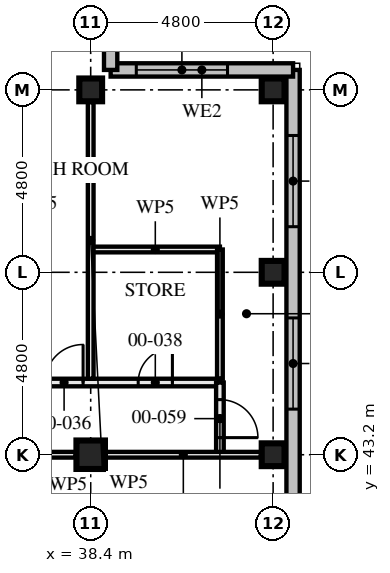
"""IFC4 building model, lengths in metres.
Left out: names, types, materials, properties, quantities, classifications, styles, units other than length and angle.
Written with IfcOpenShell. Run it as: python <this file> out.ifc"""

import sys

from ifc_helpers import new_model, si_unit, direction, frame, frame_2d, origin, origin_2d, place, context, subcontext, project, spatial, rectangle, hollow_rectangle, extrude, element, fill, save


model = new_model("IFC4")
c1 = context("Model", 3, precision=1e-05, world=origin(), true_north=direction((0.0, 1.0)))
c2 = subcontext(c1, "Body", "Model", "MODEL_VIEW")
j1 = project(units=[si_unit("LENGTHUNIT", "METRE"), si_unit("PLANEANGLEUNIT", "RADIAN")], contexts=[c1])
p1 = place(None, origin())
s1 = spatial("IfcSite", under=j1, at=p1, CompositionType="ELEMENT")
p2 = place(p1, origin())
s2 = spatial("IfcBuilding", under=s1, at=p2, CompositionType="ELEMENT")
p3 = place(p2, origin())
s3 = spatial("IfcBuildingStorey", under=s2, at=p3, CompositionType="ELEMENT", Elevation=0.0)
p4 = place(p3, frame((38.4, 43.2, 0.0), z_axis=(0.0, 0.0, 1.0), x_axis=(0.0, 1.0, 0.0)))
e1 = element("IfcColumn", 1, at=p4, inside=s3, PredefinedType="COLUMN", context=c2, shape_type="SweptSolid", body=[
    extrude(hollow_rectangle(XDim=0.75, YDim=0.75, WallThickness=0.08, at=origin_2d()), origin(), (0.0, 0.0, 1.0), 4.5),
])
p5 = place(p3, frame((38.4, 52.8, 0.0), z_axis=(0.0, 0.0, 1.0), x_axis=(0.0, 1.0, 0.0)))
e2 = element("IfcColumn", 2, at=p5, inside=s3, PredefinedType="COLUMN", context=c2, shape_type="SweptSolid", body=[
    extrude(hollow_rectangle(XDim=0.6, YDim=0.6, WallThickness=0.06, at=origin_2d()), origin(), (0.0, 0.0, 1.0), 4.5),
])
for number, where, z_axis, x_axis in (
    (3, (43.2, 43.2, 0.0), (0.0, 0.0, 1.0), (0.0, 1.0, 0.0)),
    (4, (43.2, 48.0, 0.0), (0.0, 0.0, 1.0), (1.0, 0.0, 0.0)),
):
    element("IfcColumn", number, at=place(p3, frame(where, z_axis=z_axis, x_axis=x_axis)), inside=s3, PredefinedType="COLUMN", context=c2, shape_type="SweptSolid", body=[
        extrude(hollow_rectangle(XDim=0.6, YDim=0.6, WallThickness=0.08, at=origin_2d()), origin(), (0.0, 0.0, 1.0), 4.5),
    ])
p6 = place(p3, frame((43.2, 52.8, 0.0), z_axis=(0.0, 0.0, 1.0), x_axis=(0.0, 1.0, 0.0)))
e5 = element("IfcColumn", 5, at=p6, inside=s3, PredefinedType="COLUMN", context=c2, shape_type="SweptSolid", body=[
    extrude(hollow_rectangle(XDim=0.6, YDim=0.6, WallThickness=0.06, at=origin_2d()), origin(), (0.0, 0.0, 1.0), 4.5),
])
p7 = place(p3, frame((43.725, 14.925, 0.0), z_axis=(0.0, 0.0, 1.0), x_axis=(0.0, 1.0, 0.0)))
e6 = element("IfcWall", 6, at=p7, inside=s3, PredefinedType="SOLIDWALL", context=c2, shape_type="SweptSolid", body=[
    extrude(rectangle(XDim=38.4, YDim=0.35, at=frame_2d((19.2, 0.0))), origin(), (0.0, 0.0, 1.0), 4.5),
])
p8 = place(p7, frame((15.675, 0.0, 0.0)))
e7 = element("IfcOpeningElement", 7, at=p8, cuts=e6, PredefinedType="OPENING", context=c2, shape_type="SweptSolid", body=[
    extrude(rectangle(XDim=1.2, YDim=2.4, at=frame_2d((0.6, 1.2))), frame((0.0, 0.186, 0.0), z_axis=(0.0, -1.0, 0.0), x_axis=(1.0, 0.0, 0.0)), (0.0, 0.0, 1.0), 0.371),
])
p9 = place(p7, frame((0.675, 0.0, 0.9)))
e8 = element("IfcOpeningElement", 8, at=p9, cuts=e6, PredefinedType="OPENING", context=c2, shape_type="SweptSolid", body=[
    extrude(rectangle(XDim=2.4, YDim=2.4, at=frame_2d((1.2, 1.2))), frame((0.0, 0.186, 0.0), z_axis=(0.0, -1.0, 0.0), x_axis=(1.0, 0.0, 0.0)), (0.0, 0.0, 1.0), 0.371),
])
p10 = place(p7, frame((5.475, 0.0, 0.9)))
e9 = element("IfcOpeningElement", 9, at=p10, cuts=e6, PredefinedType="OPENING", context=c2, shape_type="SweptSolid", body=[
    extrude(rectangle(XDim=2.4, YDim=2.4, at=frame_2d((1.2, 1.2))), frame((0.0, 0.186, 0.0), z_axis=(0.0, -1.0, 0.0), x_axis=(1.0, 0.0, 0.0)), (0.0, 0.0, 1.0), 0.371),
])
p11 = place(p7, frame((10.275, 0.0, 0.9)))
e10 = element("IfcOpeningElement", 10, at=p11, cuts=e6, PredefinedType="OPENING", context=c2, shape_type="SweptSolid", body=[
    extrude(rectangle(XDim=2.4, YDim=2.4, at=frame_2d((1.2, 1.2))), frame((0.0, 0.186, 0.0), z_axis=(0.0, -1.0, 0.0), x_axis=(1.0, 0.0, 0.0)), (0.0, 0.0, 1.0), 0.371),
])
p12 = place(p7, frame((19.875, 0.0, 0.9)))
e11 = element("IfcOpeningElement", 11, at=p12, cuts=e6, PredefinedType="OPENING", context=c2, shape_type="SweptSolid", body=[
    extrude(rectangle(XDim=2.4, YDim=2.4, at=frame_2d((1.2, 1.2))), frame((0.0, 0.186, 0.0), z_axis=(0.0, -1.0, 0.0), x_axis=(1.0, 0.0, 0.0)), (0.0, 0.0, 1.0), 0.371),
])
p13 = place(p7, frame((24.675, 0.0, 0.9)))
e12 = element("IfcOpeningElement", 12, at=p13, cuts=e6, PredefinedType="OPENING", context=c2, shape_type="SweptSolid", body=[
    extrude(rectangle(XDim=2.4, YDim=2.4, at=frame_2d((1.2, 1.2))), frame((0.0, 0.186, 0.0), z_axis=(0.0, -1.0, 0.0), x_axis=(1.0, 0.0, 0.0)), (0.0, 0.0, 1.0), 0.371),
])
p14 = place(p7, frame((29.475, 0.0, 0.9)))
e13 = element("IfcOpeningElement", 13, at=p14, cuts=e6, PredefinedType="OPENING", context=c2, shape_type="SweptSolid", body=[
    extrude(rectangle(XDim=2.4, YDim=2.4, at=frame_2d((1.2, 1.2))), frame((0.0, 0.186, 0.0), z_axis=(0.0, -1.0, 0.0), x_axis=(1.0, 0.0, 0.0)), (0.0, 0.0, 1.0), 0.371),
])
p15 = place(p7, frame((34.275, 0.0, 0.9)))
e14 = element("IfcOpeningElement", 14, at=p15, cuts=e6, PredefinedType="OPENING", context=c2, shape_type="SweptSolid", body=[
    extrude(rectangle(XDim=2.4, YDim=2.4, at=frame_2d((1.2, 1.2))), frame((0.0, 0.186, 0.0), z_axis=(0.0, -1.0, 0.0), x_axis=(1.0, 0.0, 0.0)), (0.0, 0.0, 1.0), 0.371),
])
p16 = place(p3, frame((43.725, 53.325, 0.0), z_axis=(0.0, 0.0, 1.0), x_axis=(-1.0, 0.0, 0.0)))
e15 = element("IfcWall", 15, at=p16, inside=s3, PredefinedType="SOLIDWALL", context=c2, shape_type="SweptSolid", body=[
    extrude(rectangle(XDim=4.8, YDim=0.35, at=frame_2d((2.4, 0.0))), origin(), (0.0, 0.0, 1.0), 4.5),
])
p17 = place(p16, frame((1.725, 0.0, 0.9)))
e16 = element("IfcOpeningElement", 16, at=p17, cuts=e15, PredefinedType="OPENING", context=c2, shape_type="SweptSolid", body=[
    extrude(rectangle(XDim=2.4, YDim=2.4, at=frame_2d((1.2, 1.2))), frame((0.0, 0.186, 0.0), z_axis=(0.0, -1.0, 0.0), x_axis=(1.0, 0.0, 0.0)), (0.0, 0.0, 1.0), 0.371),
])
p18 = place(p3, frame((38.925, 53.325, 0.0), z_axis=(0.0, 0.0, 1.0), x_axis=(0.0, 1.0, 0.0)))
e17 = element("IfcWall", 17, at=p18, inside=s3, PredefinedType="SOLIDWALL", context=c2, shape_type="SweptSolid", body=[
    extrude(rectangle(XDim=4.8, YDim=0.35, at=frame_2d((2.4, 0.0))), origin(), (0.0, 0.0, 1.0), 4.5),
])
p19 = place(p18, frame((0.675, 0.0, 0.9)))
e18 = element("IfcOpeningElement", 18, at=p19, cuts=e17, PredefinedType="OPENING", context=c2, shape_type="SweptSolid", body=[
    extrude(rectangle(XDim=2.4, YDim=2.4, at=frame_2d((1.2, 1.2))), frame((0.0, 0.186, 0.0), z_axis=(0.0, -1.0, 0.0), x_axis=(1.0, 0.0, 0.0)), (0.0, 0.0, 1.0), 0.371),
])
p20 = place(p3, frame((41.8, 48.6, 0.0), z_axis=(0.0, 0.0, 1.0), x_axis=(0.0, -1.0, 0.0)))
e19 = element("IfcWall", 19, at=p20, inside=s3, PredefinedType="PARTITIONING", context=c2, shape_type="SweptSolid", body=[
    extrude(rectangle(XDim=3.4, YDim=0.15, at=frame_2d((1.7, 0.0))), origin(), (0.0, 0.0, 1.0), 3.55),
])
p21 = place(p3, frame((41.8, 48.6, 0.0), z_axis=(0.0, 0.0, 1.0), x_axis=(-1.0, 0.0, 0.0)))
e20 = element("IfcWall", 20, at=p21, inside=s3, PredefinedType="PARTITIONING", context=c2, shape_type="SweptSolid", body=[
    extrude(rectangle(XDim=3.4, YDim=0.15, at=frame_2d((1.7, 0.0))), origin(), (0.0, 0.0, 1.0), 4.33),
])
p22 = place(p3, frame((38.4, 52.48, 0.0), z_axis=(0.0, 0.0, 1.0), x_axis=(0.0, -1.0, 0.0)))
e21 = element("IfcWall", 21, at=p22, inside=s3, PredefinedType="PARTITIONING", context=c2, shape_type="SweptSolid", body=[
    extrude(rectangle(XDim=7.28, YDim=0.15, at=frame_2d((3.64, 0.0))), origin(), (0.0, 0.0, 1.0), 3.55),
])
p23 = place(p3, frame((41.8, 45.1, 0.0), z_axis=(0.0, 0.0, 1.0), x_axis=(-1.0, 0.0, 0.0)))
e22 = element("IfcWall", 22, at=p23, inside=s3, PredefinedType="PARTITIONING", context=c2, shape_type="SweptSolid", body=[
    extrude(rectangle(XDim=13.0, YDim=0.2, at=frame_2d((6.5, 0.0))), origin(), (0.0, 0.0, 1.0), 4.33),
])
p24 = place(p23, frame((3.6, 0.0, 0.0)))
e23 = element("IfcOpeningElement", 23, at=p24, cuts=e22, PredefinedType="OPENING", context=c2, shape_type="SweptSolid", body=[
    extrude(rectangle(XDim=1.0, YDim=2.4, at=frame_2d((0.5, 1.2))), frame((0.0, 0.111, 0.0), z_axis=(0.0, -1.0, 0.0), x_axis=(1.0, 0.0, 0.0)), (0.0, 0.0, 1.0), 0.221),
])
p25 = place(p23, frame((8.4, 0.0, 0.0)))
e24 = element("IfcOpeningElement", 24, at=p25, cuts=e22, PredefinedType="OPENING", context=c2, shape_type="SweptSolid", body=[
    extrude(rectangle(XDim=1.0, YDim=2.4, at=frame_2d((0.5, 1.2))), frame((0.0, 0.111, 0.0), z_axis=(0.0, -1.0, 0.0), x_axis=(1.0, 0.0, 0.0)), (0.0, 0.0, 1.0), 0.221),
])
p26 = place(p23, frame((1.25, 0.0, 0.0)))
e25 = element("IfcOpeningElement", 25, at=p26, cuts=e22, PredefinedType="OPENING", context=c2, shape_type="SweptSolid", body=[
    extrude(rectangle(XDim=0.9, YDim=2.1, at=frame_2d((0.45, 1.05))), frame((0.0, 0.111, 0.0), z_axis=(0.0, -1.0, 0.0), x_axis=(1.0, 0.0, 0.0)), (0.0, 0.0, 1.0), 0.221),
])
p27 = place(p23, frame((6.05, 0.0, 0.0)))
e26 = element("IfcOpeningElement", 26, at=p27, cuts=e22, PredefinedType="OPENING", context=c2, shape_type="SweptSolid", body=[
    extrude(rectangle(XDim=0.9, YDim=2.1, at=frame_2d((0.45, 1.05))), frame((0.0, 0.111, 0.0), z_axis=(0.0, -1.0, 0.0), x_axis=(1.0, 0.0, 0.0)), (0.0, 0.0, 1.0), 0.221),
])
p28 = place(p23, frame((10.85, 0.0, 0.0)))
e27 = element("IfcOpeningElement", 27, at=p28, cuts=e22, PredefinedType="OPENING", context=c2, shape_type="SweptSolid", body=[
    extrude(rectangle(XDim=0.9, YDim=2.1, at=frame_2d((0.45, 1.05))), frame((0.0, 0.111, 0.0), z_axis=(0.0, -1.0, 0.0), x_axis=(1.0, 0.0, 0.0)), (0.0, 0.0, 1.0), 0.221),
])
p29 = place(p3, frame((42.88, 43.2, 0.0), z_axis=(0.0, 0.0, 1.0), x_axis=(-1.0, 0.0, 0.0)))
e28 = element("IfcWall", 28, at=p29, inside=s3, PredefinedType="PARTITIONING", context=c2, shape_type="SweptSolid", body=[
    extrude(rectangle(XDim=4.085, YDim=0.15, at=frame_2d((2.042, 0.0))), origin(), (0.0, 0.0, 1.0), 3.32),
])
p30 = place(p3, frame((38.005, 43.2, 0.0), z_axis=(0.0, 0.0, 1.0), x_axis=(-1.0, 0.0, 0.0)))
e29 = element("IfcWall", 29, at=p30, inside=s3, PredefinedType="PARTITIONING", context=c2, shape_type="SweptSolid", body=[
    extrude(rectangle(XDim=4.01, YDim=0.15, at=frame_2d((2.005, 0.0))), origin(), (0.0, 0.0, 1.0), 3.32),
])
p31 = place(p3, frame((41.8, 45.1, 0.0), z_axis=(0.0, 0.0, 1.0), x_axis=(0.0, -1.0, 0.0)))
e30 = element("IfcWall", 30, at=p31, inside=s3, PredefinedType="PARTITIONING", context=c2, shape_type="SweptSolid", body=[
    extrude(rectangle(XDim=1.9, YDim=0.2, at=frame_2d((0.95, 0.0))), origin(), (0.0, 0.0, 1.0), 4.33),
])
p32 = place(p31, frame((0.45, 0.0, 0.0)))
e31 = element("IfcOpeningElement", 31, at=p32, cuts=e30, PredefinedType="OPENING", context=c2, shape_type="SweptSolid", body=[
    extrude(rectangle(XDim=1.0, YDim=2.4, at=frame_2d((0.5, 1.2))), frame((0.0, 0.111, 0.0), z_axis=(0.0, -1.0, 0.0), x_axis=(1.0, 0.0, 0.0)), (0.0, 0.0, 1.0), 0.221),
])
p33 = place(p14, origin())
e32 = element("IfcWindow", 32, at=p33, inside=s3, PartitioningType="SINGLE_PANEL", PredefinedType="WINDOW", context=c2, shape_type="SweptSolid", body=[
    extrude(rectangle(XDim=2.4, YDim=2.4, at=frame_2d((1.2, 1.2))), frame((0.0, 0.03, 0.0), z_axis=(0.0, -1.0, 0.0), x_axis=(1.0, 0.0, 0.0)), (0.0, 0.0, 1.0), 0.06),
])
fill(e13, e32)
p34 = place(p15, origin())
e33 = element("IfcWindow", 33, at=p34, inside=s3, PartitioningType="SINGLE_PANEL", PredefinedType="WINDOW", context=c2, shape_type="SweptSolid", body=[
    extrude(rectangle(XDim=2.4, YDim=2.4, at=frame_2d((1.2, 1.2))), frame((0.0, 0.03, 0.0), z_axis=(0.0, -1.0, 0.0), x_axis=(1.0, 0.0, 0.0)), (0.0, 0.0, 1.0), 0.06),
])
fill(e14, e33)
p35 = place(p17, origin())
e34 = element("IfcWindow", 34, at=p35, inside=s3, PartitioningType="SINGLE_PANEL", PredefinedType="WINDOW", context=c2, shape_type="SweptSolid", body=[
    extrude(rectangle(XDim=2.4, YDim=2.4, at=frame_2d((1.2, 1.2))), frame((0.0, 0.03, 0.0), z_axis=(0.0, -1.0, 0.0), x_axis=(1.0, 0.0, 0.0)), (0.0, 0.0, 1.0), 0.06),
])
fill(e16, e34)
p36 = place(p24, frame((1.0, 0.0, 0.0), z_axis=(0.0, 0.0, 1.0), x_axis=(-1.0, 0.0, 0.0)))
e35 = element("IfcDoor", 35, at=p36, inside=s3, OperationType="SINGLE_SWING_LEFT", PredefinedType="DOOR", context=c2, shape_type="SweptSolid", body=[
    extrude(rectangle(XDim=1.0, YDim=2.4, at=frame_2d((0.5, 1.2))), frame((0.0, 0.027, 0.0), z_axis=(0.0, -1.0, 0.0), x_axis=(1.0, 0.0, 0.0)), (0.0, 0.0, 1.0), 0.054),
])
fill(e23, e35)
p37 = place(p26, frame((0.9, 0.0, 0.0), z_axis=(0.0, 0.0, 1.0), x_axis=(-1.0, 0.0, 0.0)))
e36 = element("IfcDoor", 36, at=p37, inside=s3, OperationType="SINGLE_SWING_LEFT", PredefinedType="DOOR", context=c2, shape_type="SweptSolid", body=[
    extrude(rectangle(XDim=0.9, YDim=2.1, at=frame_2d((0.45, 1.05))), frame((0.0, 0.027, 0.0), z_axis=(0.0, -1.0, 0.0), x_axis=(1.0, 0.0, 0.0)), (0.0, 0.0, 1.0), 0.054),
])
fill(e25, e36)
p38 = place(p32, origin())
e37 = element("IfcDoor", 37, at=p38, inside=s3, OperationType="SINGLE_SWING_LEFT", PredefinedType="DOOR", context=c2, shape_type="SweptSolid", body=[
    extrude(rectangle(XDim=1.0, YDim=2.4, at=frame_2d((0.5, 1.2))), frame((0.0, 0.027, 0.0), z_axis=(0.0, -1.0, 0.0), x_axis=(1.0, 0.0, 0.0)), (0.0, 0.0, 1.0), 0.054),
])
fill(e31, e37)
save(model, sys.argv[1])
